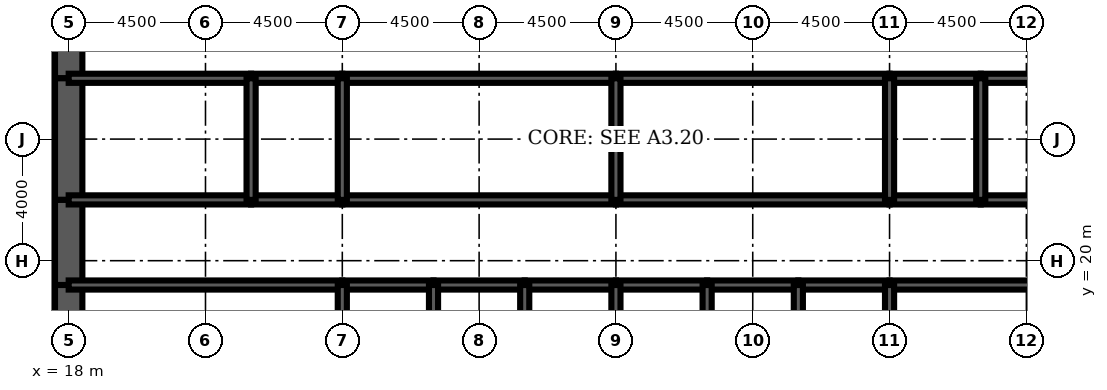
"""IFC4 building model, lengths in metres.
Left out: names, types, materials, properties, quantities, classifications, styles, units other than length and angle.
Written with IfcOpenShell. Run it as: python <this file> out.ifc"""

import sys

from ifc_helpers import new_model, si_unit, direction, frame, frame_2d, origin, place, context, subcontext, project, spatial, rectangle, extrude, element, fill, save


model = new_model("IFC4")
c1 = context("Model", 3, precision=1e-05, world=origin(), true_north=direction((0.0, 1.0)))
c2 = subcontext(c1, "Body", "Model", "MODEL_VIEW")
j1 = project(units=[si_unit("LENGTHUNIT", "METRE"), si_unit("PLANEANGLEUNIT", "RADIAN")], contexts=[c1])
p1 = place(None, origin())
s1 = spatial("IfcSite", under=j1, at=p1, CompositionType="ELEMENT")
p2 = place(p1, origin())
s2 = spatial("IfcBuilding", under=s1, at=p2, CompositionType="ELEMENT")
p3 = place(p2, frame((0.0, 0.0, 86.0)))
s3 = spatial("IfcBuildingStorey", under=s2, at=p3, CompositionType="ELEMENT", Elevation=86.0)
p4 = place(p3, frame((18.0, 28.8, 0.0), z_axis=(0.0, 0.0, 1.0), x_axis=(0.0, -1.0, 0.0)))
e1 = element("IfcWall", 1, at=p4, inside=s3, PredefinedType="SHEAR", context=c2, shape_type="SweptSolid", body=[
    extrude(rectangle(XDim=2.8, YDim=0.9, at=frame_2d((1.4, 0.0))), origin(), (0.0, 0.0, 1.0), 4.5),
])
p5 = place(p4, frame((0.4, 0.0, 0.0)))
e2 = element("IfcOpeningElement", 2, at=p5, cuts=e1, PredefinedType="OPENING", context=c2, shape_type="SweptSolid", body=[
    extrude(rectangle(XDim=1.8, YDim=2.1, at=frame_2d((0.9, 1.05))), frame((0.0, 0.46, 0.0), z_axis=(0.0, -1.0, 0.0), x_axis=(1.0, 0.0, 0.0)), (0.0, 0.0, 1.0), 0.92),
])
p6 = place(p3, frame((18.0, 26.0, 0.0), z_axis=(0.0, 0.0, 1.0), x_axis=(0.0, -1.0, 0.0)))
e3 = element("IfcWall", 3, at=p6, inside=s3, PredefinedType="SHEAR", context=c2, shape_type="SweptSolid", body=[
    extrude(rectangle(XDim=4.0, YDim=0.9, at=frame_2d((2.0, 0.0))), origin(), (0.0, 0.0, 1.0), 4.5),
])
p7 = place(p3, frame((18.0, 22.0, 0.0), z_axis=(0.0, 0.0, 1.0), x_axis=(0.0, -1.0, 0.0)))
e4 = element("IfcWall", 4, at=p7, inside=s3, PredefinedType="SHEAR", context=c2, shape_type="SweptSolid", body=[
    extrude(rectangle(XDim=2.8, YDim=0.9, at=frame_2d((1.4, 0.0))), origin(), (0.0, 0.0, 1.0), 4.5),
])
p8 = place(p7, frame((0.6, 0.0, 0.0)))
e5 = element("IfcOpeningElement", 5, at=p8, cuts=e4, PredefinedType="OPENING", context=c2, shape_type="SweptSolid", body=[
    extrude(rectangle(XDim=1.8, YDim=2.1, at=frame_2d((0.9, 1.05))), frame((0.0, 0.46, 0.0), z_axis=(0.0, -1.0, 0.0), x_axis=(1.0, 0.0, 0.0)), (0.0, 0.0, 1.0), 0.92),
])
p9 = place(p3, frame((18.0, 19.2, 0.0), z_axis=(0.0, 0.0, 1.0), x_axis=(0.0, -1.0, 0.0)))
e6 = element("IfcWall", 6, at=p9, inside=s3, PredefinedType="SHEAR", context=c2, shape_type="SweptSolid", body=[
    extrude(rectangle(XDim=3.2, YDim=0.9, at=frame_2d((1.6, 0.0))), origin(), (0.0, 0.0, 1.0), 4.5),
])
p10 = place(p3, frame((18.0, 19.2, 0.0), z_axis=(0.0, 0.0, 1.0), x_axis=(1.0, 0.0, 0.0)))
e7 = element("IfcWall", 7, at=p10, inside=s3, PredefinedType="SOLIDWALL", context=c2, shape_type="SweptSolid", body=[
    extrude(rectangle(XDim=9.0, YDim=0.3, at=frame_2d((4.5, 0.0))), origin(), (0.0, 0.0, 1.0), 4.5),
])
p11 = place(p10, frame((0.65, 0.0, 0.0)))
e8 = element("IfcOpeningElement", 8, at=p11, cuts=e7, PredefinedType="OPENING", context=c2, shape_type="SweptSolid", body=[
    extrude(rectangle(XDim=1.0, YDim=2.1, at=frame_2d((0.5, 1.05))), frame((0.0, 0.16, 0.0), z_axis=(0.0, -1.0, 0.0), x_axis=(1.0, 0.0, 0.0)), (0.0, 0.0, 1.0), 0.32),
])
p12 = place(p3, frame((27.0, 19.2, 0.0), z_axis=(0.0, 0.0, 1.0), x_axis=(1.0, 0.0, 0.0)))
e9 = element("IfcWall", 9, at=p12, inside=s3, PredefinedType="SOLIDWALL", context=c2, shape_type="SweptSolid", body=[
    extrude(rectangle(XDim=3.0, YDim=0.3, at=frame_2d((1.5, 0.0))), origin(), (0.0, 0.0, 1.0), 4.5),
])
p13 = place(p12, frame((0.95, 0.0, 0.0)))
e10 = element("IfcOpeningElement", 10, at=p13, cuts=e9, PredefinedType="OPENING", context=c2, shape_type="SweptSolid", body=[
    extrude(rectangle(XDim=1.1, YDim=2.2, at=frame_2d((0.55, 1.1))), frame((0.0, 0.16, 0.0), z_axis=(0.0, -1.0, 0.0), x_axis=(1.0, 0.0, 0.0)), (0.0, 0.0, 1.0), 0.32),
])
p14 = place(p3, frame((30.0, 19.2, 0.0), z_axis=(0.0, 0.0, 1.0), x_axis=(1.0, 0.0, 0.0)))
e11 = element("IfcWall", 11, at=p14, inside=s3, PredefinedType="SOLIDWALL", context=c2, shape_type="SweptSolid", body=[
    extrude(rectangle(XDim=3.0, YDim=0.3, at=frame_2d((1.5, 0.0))), origin(), (0.0, 0.0, 1.0), 4.5),
])
p15 = place(p14, frame((0.95, 0.0, 0.0)))
e12 = element("IfcOpeningElement", 12, at=p15, cuts=e11, PredefinedType="OPENING", context=c2, shape_type="SweptSolid", body=[
    extrude(rectangle(XDim=1.1, YDim=2.2, at=frame_2d((0.55, 1.1))), frame((0.0, 0.16, 0.0), z_axis=(0.0, -1.0, 0.0), x_axis=(1.0, 0.0, 0.0)), (0.0, 0.0, 1.0), 0.32),
])
p16 = place(p3, frame((33.0, 19.2, 0.0), z_axis=(0.0, 0.0, 1.0), x_axis=(1.0, 0.0, 0.0)))
e13 = element("IfcWall", 13, at=p16, inside=s3, PredefinedType="SOLIDWALL", context=c2, shape_type="SweptSolid", body=[
    extrude(rectangle(XDim=3.0, YDim=0.3, at=frame_2d((1.5, 0.0))), origin(), (0.0, 0.0, 1.0), 4.5),
])
p17 = place(p16, frame((0.95, 0.0, 0.0)))
e14 = element("IfcOpeningElement", 14, at=p17, cuts=e13, PredefinedType="OPENING", context=c2, shape_type="SweptSolid", body=[
    extrude(rectangle(XDim=1.1, YDim=2.2, at=frame_2d((0.55, 1.1))), frame((0.0, 0.16, 0.0), z_axis=(0.0, -1.0, 0.0), x_axis=(1.0, 0.0, 0.0)), (0.0, 0.0, 1.0), 0.32),
])
p18 = place(p3, frame((36.0, 19.2, 0.0), z_axis=(0.0, 0.0, 1.0), x_axis=(1.0, 0.0, 0.0)))
e15 = element("IfcWall", 15, at=p18, inside=s3, PredefinedType="SOLIDWALL", context=c2, shape_type="SweptSolid", body=[
    extrude(rectangle(XDim=3.0, YDim=0.3, at=frame_2d((1.5, 0.0))), origin(), (0.0, 0.0, 1.0), 4.5),
])
p19 = place(p18, frame((0.95, 0.0, 0.0)))
e16 = element("IfcOpeningElement", 16, at=p19, cuts=e15, PredefinedType="OPENING", context=c2, shape_type="SweptSolid", body=[
    extrude(rectangle(XDim=1.1, YDim=2.2, at=frame_2d((0.55, 1.1))), frame((0.0, 0.16, 0.0), z_axis=(0.0, -1.0, 0.0), x_axis=(1.0, 0.0, 0.0)), (0.0, 0.0, 1.0), 0.32),
])
for number, where, z_axis, x_axis in (
    (17, (39.0, 19.2, 0.0), (0.0, 0.0, 1.0), (1.0, 0.0, 0.0)),
    (18, (42.0, 19.2, 0.0), (0.0, 0.0, 1.0), (1.0, 0.0, 0.0)),
):
    element("IfcWall", number, at=place(p3, frame(where, z_axis=z_axis, x_axis=x_axis)), inside=s3, PredefinedType="SOLIDWALL", context=c2, shape_type="SweptSolid", body=[
        extrude(rectangle(XDim=3.0, YDim=0.3, at=frame_2d((1.5, 0.0))), origin(), (0.0, 0.0, 1.0), 4.5),
    ])
p20 = place(p3, frame((45.0, 19.2, 0.0), z_axis=(0.0, 0.0, 1.0), x_axis=(1.0, 0.0, 0.0)))
e19 = element("IfcWall", 19, at=p20, inside=s3, PredefinedType="SOLIDWALL", context=c2, shape_type="SweptSolid", body=[
    extrude(rectangle(XDim=9.0, YDim=0.3, at=frame_2d((4.5, 0.0))), origin(), (0.0, 0.0, 1.0), 4.5),
])
p21 = place(p20, frame((7.35, 0.0, 0.0)))
e20 = element("IfcOpeningElement", 20, at=p21, cuts=e19, PredefinedType="OPENING", context=c2, shape_type="SweptSolid", body=[
    extrude(rectangle(XDim=1.0, YDim=2.1, at=frame_2d((0.5, 1.05))), frame((0.0, 0.16, 0.0), z_axis=(0.0, -1.0, 0.0), x_axis=(1.0, 0.0, 0.0)), (0.0, 0.0, 1.0), 0.32),
])
p22 = place(p3, frame((18.0, 22.0, 0.0), z_axis=(0.0, 0.0, 1.0), x_axis=(1.0, 0.0, 0.0)))
e21 = element("IfcWall", 21, at=p22, inside=s3, PredefinedType="SOLIDWALL", context=c2, shape_type="SweptSolid", body=[
    extrude(rectangle(XDim=6.0, YDim=0.3, at=frame_2d((3.0, 0.0))), origin(), (0.0, 0.0, 1.0), 4.5),
])
p23 = place(p22, frame((4.4, 0.0, 0.0)))
e22 = element("IfcOpeningElement", 22, at=p23, cuts=e21, PredefinedType="OPENING", context=c2, shape_type="SweptSolid", body=[
    extrude(rectangle(XDim=1.0, YDim=2.1, at=frame_2d((0.5, 1.05))), frame((0.0, 0.16, 0.0), z_axis=(0.0, -1.0, 0.0), x_axis=(1.0, 0.0, 0.0)), (0.0, 0.0, 1.0), 0.32),
])
p24 = place(p22, frame((0.85, 0.0, 0.0)))
e23 = element("IfcOpeningElement", 23, at=p24, cuts=e21, PredefinedType="OPENING", context=c2, shape_type="SweptSolid", body=[
    extrude(rectangle(XDim=1.0, YDim=2.1, at=frame_2d((0.5, 1.05))), frame((0.0, 0.16, 0.0), z_axis=(0.0, -1.0, 0.0), x_axis=(1.0, 0.0, 0.0)), (0.0, 0.0, 1.0), 0.32),
])
p25 = place(p3, frame((24.0, 22.0, 0.0), z_axis=(0.0, 0.0, 1.0), x_axis=(1.0, 0.0, 0.0)))
e24 = element("IfcWall", 24, at=p25, inside=s3, PredefinedType="SOLIDWALL", context=c2, shape_type="SweptSolid", body=[
    extrude(rectangle(XDim=3.0, YDim=0.3, at=frame_2d((1.5, 0.0))), origin(), (0.0, 0.0, 1.0), 4.5),
])
p26 = place(p25, frame((1.0, 0.0, 0.0)))
e25 = element("IfcOpeningElement", 25, at=p26, cuts=e24, PredefinedType="OPENING", context=c2, shape_type="SweptSolid", body=[
    extrude(rectangle(XDim=1.0, YDim=2.1, at=frame_2d((0.5, 1.05))), frame((0.0, 0.16, 0.0), z_axis=(0.0, -1.0, 0.0), x_axis=(1.0, 0.0, 0.0)), (0.0, 0.0, 1.0), 0.32),
])
p27 = place(p3, frame((27.0, 22.0, 0.0), z_axis=(0.0, 0.0, 1.0), x_axis=(1.0, 0.0, 0.0)))
e26 = element("IfcWall", 26, at=p27, inside=s3, PredefinedType="SOLIDWALL", context=c2, shape_type="SweptSolid", body=[
    extrude(rectangle(XDim=9.0, YDim=0.3, at=frame_2d((4.5, 0.0))), origin(), (0.0, 0.0, 1.0), 4.5),
])
p28 = place(p27, frame((4.0, 0.0, 0.0)))
e27 = element("IfcOpeningElement", 27, at=p28, cuts=e26, PredefinedType="OPENING", context=c2, shape_type="SweptSolid", body=[
    extrude(rectangle(XDim=1.0, YDim=2.1, at=frame_2d((0.5, 1.05))), frame((0.0, 0.16, 0.0), z_axis=(0.0, -1.0, 0.0), x_axis=(1.0, 0.0, 0.0)), (0.0, 0.0, 1.0), 0.32),
])
p29 = place(p3, frame((36.0, 22.0, 0.0), z_axis=(0.0, 0.0, 1.0), x_axis=(1.0, 0.0, 0.0)))
e28 = element("IfcWall", 28, at=p29, inside=s3, PredefinedType="SOLIDWALL", context=c2, shape_type="SweptSolid", body=[
    extrude(rectangle(XDim=9.0, YDim=0.3, at=frame_2d((4.5, 0.0))), origin(), (0.0, 0.0, 1.0), 4.5),
])
p30 = place(p29, frame((4.0, 0.0, 0.0)))
e29 = element("IfcOpeningElement", 29, at=p30, cuts=e28, PredefinedType="OPENING", context=c2, shape_type="SweptSolid", body=[
    extrude(rectangle(XDim=1.0, YDim=2.1, at=frame_2d((0.5, 1.05))), frame((0.0, 0.16, 0.0), z_axis=(0.0, -1.0, 0.0), x_axis=(1.0, 0.0, 0.0)), (0.0, 0.0, 1.0), 0.32),
])
p31 = place(p3, frame((45.0, 22.0, 0.0), z_axis=(0.0, 0.0, 1.0), x_axis=(1.0, 0.0, 0.0)))
e30 = element("IfcWall", 30, at=p31, inside=s3, PredefinedType="SOLIDWALL", context=c2, shape_type="SweptSolid", body=[
    extrude(rectangle(XDim=3.0, YDim=0.3, at=frame_2d((1.5, 0.0))), origin(), (0.0, 0.0, 1.0), 4.5),
])
p32 = place(p31, frame((1.0, 0.0, 0.0)))
e31 = element("IfcOpeningElement", 31, at=p32, cuts=e30, PredefinedType="OPENING", context=c2, shape_type="SweptSolid", body=[
    extrude(rectangle(XDim=1.0, YDim=2.1, at=frame_2d((0.5, 1.05))), frame((0.0, 0.16, 0.0), z_axis=(0.0, -1.0, 0.0), x_axis=(1.0, 0.0, 0.0)), (0.0, 0.0, 1.0), 0.32),
])
p33 = place(p3, frame((48.0, 22.0, 0.0), z_axis=(0.0, 0.0, 1.0), x_axis=(1.0, 0.0, 0.0)))
e32 = element("IfcWall", 32, at=p33, inside=s3, PredefinedType="SOLIDWALL", context=c2, shape_type="SweptSolid", body=[
    extrude(rectangle(XDim=6.0, YDim=0.3, at=frame_2d((3.0, 0.0))), origin(), (0.0, 0.0, 1.0), 4.5),
])
p34 = place(p33, frame((2.0, 0.0, 0.0)))
e33 = element("IfcOpeningElement", 33, at=p34, cuts=e32, PredefinedType="OPENING", context=c2, shape_type="SweptSolid", body=[
    extrude(rectangle(XDim=1.0, YDim=2.1, at=frame_2d((0.5, 1.05))), frame((0.0, 0.16, 0.0), z_axis=(0.0, -1.0, 0.0), x_axis=(1.0, 0.0, 0.0)), (0.0, 0.0, 1.0), 0.32),
])
p35 = place(p33, frame((4.0, 0.0, 0.0)))
e34 = element("IfcOpeningElement", 34, at=p35, cuts=e32, PredefinedType="OPENING", context=c2, shape_type="SweptSolid", body=[
    extrude(rectangle(XDim=1.0, YDim=2.1, at=frame_2d((0.5, 1.05))), frame((0.0, 0.16, 0.0), z_axis=(0.0, -1.0, 0.0), x_axis=(1.0, 0.0, 0.0)), (0.0, 0.0, 1.0), 0.32),
])
p36 = place(p3, frame((18.0, 26.0, 0.0), z_axis=(0.0, 0.0, 1.0), x_axis=(1.0, 0.0, 0.0)))
e35 = element("IfcWall", 35, at=p36, inside=s3, PredefinedType="SOLIDWALL", context=c2, shape_type="SweptSolid", body=[
    extrude(rectangle(XDim=6.0, YDim=0.3, at=frame_2d((3.0, 0.0))), origin(), (0.0, 0.0, 1.0), 4.5),
])
p37 = place(p3, frame((24.0, 26.0, 0.0), z_axis=(0.0, 0.0, 1.0), x_axis=(1.0, 0.0, 0.0)))
e36 = element("IfcWall", 36, at=p37, inside=s3, PredefinedType="SOLIDWALL", context=c2, shape_type="SweptSolid", body=[
    extrude(rectangle(XDim=3.0, YDim=0.3, at=frame_2d((1.5, 0.0))), origin(), (0.0, 0.0, 1.0), 4.5),
])
for number, where, z_axis, x_axis in (
    (37, (27.0, 26.0, 0.0), (0.0, 0.0, 1.0), (1.0, 0.0, 0.0)),
    (38, (36.0, 26.0, 0.0), (0.0, 0.0, 1.0), (1.0, 0.0, 0.0)),
):
    element("IfcWall", number, at=place(p3, frame(where, z_axis=z_axis, x_axis=x_axis)), inside=s3, PredefinedType="SOLIDWALL", context=c2, shape_type="SweptSolid", body=[
        extrude(rectangle(XDim=9.0, YDim=0.3, at=frame_2d((4.5, 0.0))), origin(), (0.0, 0.0, 1.0), 4.5),
    ])
p38 = place(p3, frame((45.0, 26.0, 0.0), z_axis=(0.0, 0.0, 1.0), x_axis=(1.0, 0.0, 0.0)))
e39 = element("IfcWall", 39, at=p38, inside=s3, PredefinedType="SOLIDWALL", context=c2, shape_type="SweptSolid", body=[
    extrude(rectangle(XDim=3.0, YDim=0.3, at=frame_2d((1.5, 0.0))), origin(), (0.0, 0.0, 1.0), 4.5),
])
p39 = place(p3, frame((48.0, 26.0, 0.0), z_axis=(0.0, 0.0, 1.0), x_axis=(1.0, 0.0, 0.0)))
e40 = element("IfcWall", 40, at=p39, inside=s3, PredefinedType="SOLIDWALL", context=c2, shape_type="SweptSolid", body=[
    extrude(rectangle(XDim=6.0, YDim=0.3, at=frame_2d((3.0, 0.0))), origin(), (0.0, 0.0, 1.0), 4.5),
])
for number, where, z_axis, x_axis in (
    (41, (27.0, 16.0, 0.0), (0.0, 0.0, 1.0), (0.0, 1.0, 0.0)),
    (42, (30.0, 16.0, 0.0), (0.0, 0.0, 1.0), (0.0, 1.0, 0.0)),
    (43, (33.0, 16.0, 0.0), (0.0, 0.0, 1.0), (0.0, 1.0, 0.0)),
    (44, (36.0, 16.0, 0.0), (0.0, 0.0, 1.0), (0.0, 1.0, 0.0)),
    (45, (39.0, 16.0, 0.0), (0.0, 0.0, 1.0), (0.0, 1.0, 0.0)),
    (46, (42.0, 16.0, 0.0), (0.0, 0.0, 1.0), (0.0, 1.0, 0.0)),
    (47, (45.0, 16.0, 0.0), (0.0, 0.0, 1.0), (0.0, 1.0, 0.0)),
):
    element("IfcWall", number, at=place(p3, frame(where, z_axis=z_axis, x_axis=x_axis)), inside=s3, PredefinedType="SOLIDWALL", context=c2, shape_type="SweptSolid", body=[
        extrude(rectangle(XDim=3.2, YDim=0.3, at=frame_2d((1.6, 0.0))), origin(), (0.0, 0.0, 1.0), 4.5),
    ])
for number, where, z_axis, x_axis in (
    (48, (24.0, 22.0, 0.0), (0.0, 0.0, 1.0), (0.0, 1.0, 0.0)),
    (49, (27.0, 22.0, 0.0), (0.0, 0.0, 1.0), (0.0, 1.0, 0.0)),
    (50, (36.0, 22.0, 0.0), (0.0, 0.0, 1.0), (0.0, 1.0, 0.0)),
    (51, (45.0, 22.0, 0.0), (0.0, 0.0, 1.0), (0.0, 1.0, 0.0)),
    (52, (48.0, 22.0, 0.0), (0.0, 0.0, 1.0), (0.0, 1.0, 0.0)),
):
    element("IfcWall", number, at=place(p3, frame(where, z_axis=z_axis, x_axis=x_axis)), inside=s3, PredefinedType="SOLIDWALL", context=c2, shape_type="SweptSolid", body=[
        extrude(rectangle(XDim=4.0, YDim=0.3, at=frame_2d((2.0, 0.0))), origin(), (0.0, 0.0, 1.0), 4.5),
    ])
p40 = place(p3, frame((39.0, 22.15, 0.0), z_axis=(0.0, 0.0, 1.0), x_axis=(0.0, 1.0, 0.0)))
e53 = element("IfcWall", 53, at=p40, inside=s3, PredefinedType="PARTITIONING", context=c2, shape_type="SweptSolid", body=[
    extrude(rectangle(XDim=3.7, YDim=0.15, at=frame_2d((1.85, 0.0))), origin(), (0.0, 0.0, 1.0), 3.0),
])
p41 = place(p40, frame((2.2, 0.0, 0.0)))
e54 = element("IfcOpeningElement", 54, at=p41, cuts=e53, PredefinedType="OPENING", context=c2, shape_type="SweptSolid", body=[
    extrude(rectangle(XDim=1.0, YDim=2.1, at=frame_2d((0.5, 1.05))), frame((0.0, 0.085, 0.0), z_axis=(0.0, -1.0, 0.0), x_axis=(1.0, 0.0, 0.0)), (0.0, 0.0, 1.0), 0.17),
])
p42 = place(p3, frame((20.325, 22.15, 0.0), z_axis=(0.0, 0.0, 1.0), x_axis=(0.0, 1.0, 0.0)))
e55 = element("IfcWall", 55, at=p42, inside=s3, PredefinedType="PARTITIONING", context=c2, shape_type="SweptSolid", body=[
    extrude(rectangle(XDim=3.7, YDim=0.15, at=frame_2d((1.85, 0.0))), origin(), (0.0, 0.0, 1.0), 3.0),
])
p43 = place(p3, frame((48.6, 19.35, 0.0), z_axis=(0.0, 0.0, 1.0), x_axis=(0.0, 1.0, 0.0)))
e56 = element("IfcWall", 56, at=p43, inside=s3, PredefinedType="PARTITIONING", context=c2, shape_type="SweptSolid", body=[
    extrude(rectangle(XDim=2.5, YDim=0.15, at=frame_2d((1.25, 0.0))), origin(), (0.0, 0.0, 1.0), 3.0),
])
p44 = place(p43, frame((1.15, 0.0, 0.0)))
e57 = element("IfcOpeningElement", 57, at=p44, cuts=e56, PredefinedType="OPENING", context=c2, shape_type="SweptSolid", body=[
    extrude(rectangle(XDim=1.0, YDim=2.1, at=frame_2d((0.5, 1.05))), frame((0.0, 0.085, 0.0), z_axis=(0.0, -1.0, 0.0), x_axis=(1.0, 0.0, 0.0)), (0.0, 0.0, 1.0), 0.17),
])
p45 = place(p41, origin())
e58 = element("IfcDoor", 58, at=p45, inside=s3, OperationType="SINGLE_SWING_RIGHT", PredefinedType="DOOR", context=c2, shape_type="SweptSolid", body=[
    extrude(rectangle(XDim=1.0, YDim=2.1, at=frame_2d((0.5, 1.05))), frame((0.0, 0.025, 0.0), z_axis=(0.0, -1.0, 0.0), x_axis=(1.0, 0.0, 0.0)), (0.0, 0.0, 1.0), 0.05),
])
fill(e54, e58)
p46 = place(p44, origin())
e59 = element("IfcDoor", 59, at=p46, inside=s3, OperationType="SINGLE_SWING_RIGHT", PredefinedType="DOOR", context=c2, shape_type="SweptSolid", body=[
    extrude(rectangle(XDim=1.0, YDim=2.1, at=frame_2d((0.5, 1.05))), frame((0.0, 0.025, 0.0), z_axis=(0.0, -1.0, 0.0), x_axis=(1.0, 0.0, 0.0)), (0.0, 0.0, 1.0), 0.05),
])
fill(e57, e59)
p47 = place(p13, origin())
e60 = element("IfcDoor", 60, at=p47, inside=s3, OperationType="DOUBLE_DOOR_SLIDING", PredefinedType="USERDEFINED", context=c2, shape_type="SweptSolid", body=[
    extrude(rectangle(XDim=1.1, YDim=2.2, at=frame_2d((0.55, 1.1))), frame((0.0, 0.025, 0.0), z_axis=(0.0, -1.0, 0.0), x_axis=(1.0, 0.0, 0.0)), (0.0, 0.0, 1.0), 0.05),
])
fill(e10, e60)
p48 = place(p15, origin())
e61 = element("IfcDoor", 61, at=p48, inside=s3, OperationType="DOUBLE_DOOR_SLIDING", PredefinedType="USERDEFINED", context=c2, shape_type="SweptSolid", body=[
    extrude(rectangle(XDim=1.1, YDim=2.2, at=frame_2d((0.55, 1.1))), frame((0.0, 0.025, 0.0), z_axis=(0.0, -1.0, 0.0), x_axis=(1.0, 0.0, 0.0)), (0.0, 0.0, 1.0), 0.05),
])
fill(e12, e61)
p49 = place(p17, origin())
e62 = element("IfcDoor", 62, at=p49, inside=s3, OperationType="DOUBLE_DOOR_SLIDING", PredefinedType="USERDEFINED", context=c2, shape_type="SweptSolid", body=[
    extrude(rectangle(XDim=1.1, YDim=2.2, at=frame_2d((0.55, 1.1))), frame((0.0, 0.025, 0.0), z_axis=(0.0, -1.0, 0.0), x_axis=(1.0, 0.0, 0.0)), (0.0, 0.0, 1.0), 0.05),
])
fill(e14, e62)
p50 = place(p19, origin())
e63 = element("IfcDoor", 63, at=p50, inside=s3, OperationType="DOUBLE_DOOR_SLIDING", PredefinedType="USERDEFINED", context=c2, shape_type="SweptSolid", body=[
    extrude(rectangle(XDim=1.1, YDim=2.2, at=frame_2d((0.55, 1.1))), frame((0.0, 0.025, 0.0), z_axis=(0.0, -1.0, 0.0), x_axis=(1.0, 0.0, 0.0)), (0.0, 0.0, 1.0), 0.05),
])
fill(e16, e63)
p51 = place(p11, origin())
e64 = element("IfcDoor", 64, at=p51, inside=s3, OperationType="SINGLE_SWING_LEFT", PredefinedType="DOOR", context=c2, shape_type="SweptSolid", body=[
    extrude(rectangle(XDim=1.0, YDim=2.1, at=frame_2d((0.5, 1.05))), frame((0.0, 0.025, 0.0), z_axis=(0.0, -1.0, 0.0), x_axis=(1.0, 0.0, 0.0)), (0.0, 0.0, 1.0), 0.05),
])
fill(e8, e64)
p52 = place(p8, origin())
e65 = element("IfcDoor", 65, at=p52, inside=s3, OperationType="SINGLE_SWING_LEFT", PredefinedType="DOOR", context=c2, shape_type="SweptSolid", body=[
    extrude(rectangle(XDim=1.8, YDim=2.1, at=frame_2d((0.9, 1.05))), frame((0.0, 0.45, 0.0), z_axis=(0.0, -1.0, 0.0), x_axis=(1.0, 0.0, 0.0)), (0.0, 0.0, 1.0), 0.899),
])
fill(e5, e65)
p53 = place(p5, origin())
e66 = element("IfcDoor", 66, at=p53, inside=s3, OperationType="SINGLE_SWING_LEFT", PredefinedType="DOOR", context=c2, shape_type="SweptSolid", body=[
    extrude(rectangle(XDim=1.8, YDim=2.1, at=frame_2d((0.9, 1.05))), frame((0.0, 0.45, 0.0), z_axis=(0.0, -1.0, 0.0), x_axis=(1.0, 0.0, 0.0)), (0.0, 0.0, 1.0), 0.899),
])
fill(e2, e66)
p54 = place(p23, origin())
e67 = element("IfcDoor", 67, at=p54, inside=s3, OperationType="SINGLE_SWING_RIGHT", PredefinedType="DOOR", context=c2, shape_type="SweptSolid", body=[
    extrude(rectangle(XDim=1.0, YDim=2.1, at=frame_2d((0.5, 1.05))), frame((0.0, 0.025, 0.0), z_axis=(0.0, -1.0, 0.0), x_axis=(1.0, 0.0, 0.0)), (0.0, 0.0, 1.0), 0.05),
])
fill(e22, e67)
p55 = place(p26, origin())
e68 = element("IfcDoor", 68, at=p55, inside=s3, OperationType="SINGLE_SWING_LEFT", PredefinedType="DOOR", context=c2, shape_type="SweptSolid", body=[
    extrude(rectangle(XDim=1.0, YDim=2.1, at=frame_2d((0.5, 1.05))), frame((0.0, 0.025, 0.0), z_axis=(0.0, -1.0, 0.0), x_axis=(1.0, 0.0, 0.0)), (0.0, 0.0, 1.0), 0.05),
])
fill(e25, e68)
p56 = place(p28, origin())
e69 = element("IfcDoor", 69, at=p56, inside=s3, OperationType="SINGLE_SWING_LEFT", PredefinedType="DOOR", context=c2, shape_type="SweptSolid", body=[
    extrude(rectangle(XDim=1.0, YDim=2.1, at=frame_2d((0.5, 1.05))), frame((0.0, 0.025, 0.0), z_axis=(0.0, -1.0, 0.0), x_axis=(1.0, 0.0, 0.0)), (0.0, 0.0, 1.0), 0.05),
])
fill(e27, e69)
p57 = place(p30, origin())
e70 = element("IfcDoor", 70, at=p57, inside=s3, OperationType="SINGLE_SWING_LEFT", PredefinedType="DOOR", context=c2, shape_type="SweptSolid", body=[
    extrude(rectangle(XDim=1.0, YDim=2.1, at=frame_2d((0.5, 1.05))), frame((0.0, 0.025, 0.0), z_axis=(0.0, -1.0, 0.0), x_axis=(1.0, 0.0, 0.0)), (0.0, 0.0, 1.0), 0.05),
])
fill(e29, e70)
p58 = place(p32, origin())
e71 = element("IfcDoor", 71, at=p58, inside=s3, OperationType="SINGLE_SWING_LEFT", PredefinedType="DOOR", context=c2, shape_type="SweptSolid", body=[
    extrude(rectangle(XDim=1.0, YDim=2.1, at=frame_2d((0.5, 1.05))), frame((0.0, 0.025, 0.0), z_axis=(0.0, -1.0, 0.0), x_axis=(1.0, 0.0, 0.0)), (0.0, 0.0, 1.0), 0.05),
])
fill(e31, e71)
p59 = place(p24, origin())
e72 = element("IfcDoor", 72, at=p59, inside=s3, OperationType="SINGLE_SWING_LEFT", PredefinedType="DOOR", context=c2, shape_type="SweptSolid", body=[
    extrude(rectangle(XDim=1.0, YDim=2.1, at=frame_2d((0.5, 1.05))), frame((0.0, 0.025, 0.0), z_axis=(0.0, -1.0, 0.0), x_axis=(1.0, 0.0, 0.0)), (0.0, 0.0, 1.0), 0.05),
])
fill(e23, e72)
save(model, sys.argv[1])
